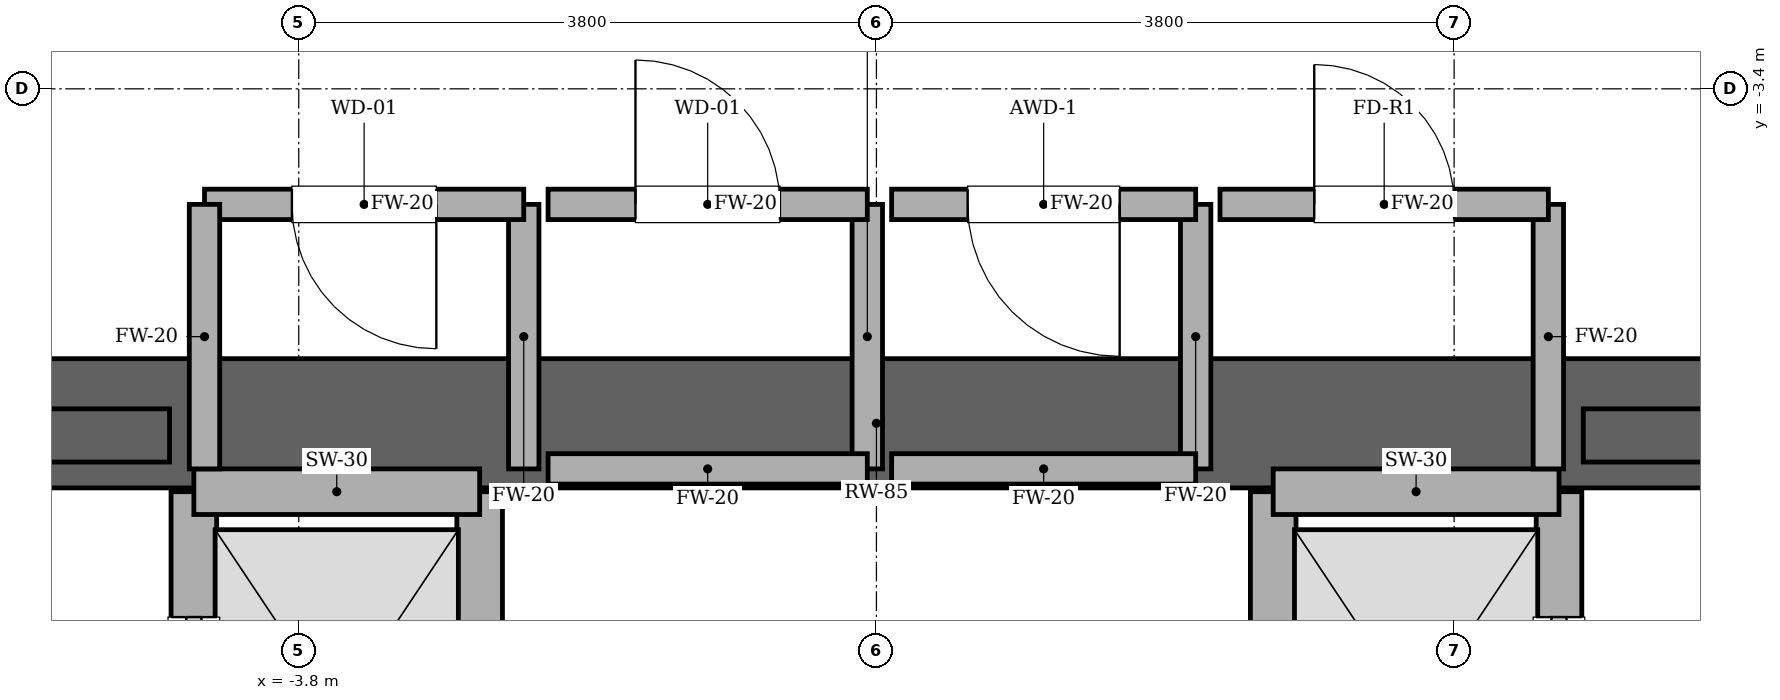
"""IFC4 building model, lengths in metres.
Left out: names, types, materials, properties, quantities, classifications, styles, units other than length and angle.
Written with IfcOpenShell. Run it as: python <this file> out.ifc"""

import sys

from ifc_helpers import new_model, si_unit, direction, frame, frame_2d, origin, place, context, subcontext, project, spatial, rectangle, extrude, element, fill, save


model = new_model("IFC4")
c1 = context("Model", 3, precision=1e-05, world=origin(), true_north=direction((0.0, 1.0)))
c2 = subcontext(c1, "Body", "Model", "MODEL_VIEW")
j1 = project(units=[si_unit("LENGTHUNIT", "METRE"), si_unit("PLANEANGLEUNIT", "RADIAN")], contexts=[c1])
p1 = place(None, origin())
s1 = spatial("IfcSite", under=j1, at=p1, CompositionType="ELEMENT")
p2 = place(p1, origin())
s2 = spatial("IfcBuilding", under=s1, at=p2, CompositionType="ELEMENT")
p3 = place(p2, frame((0.0, 0.0, -9.6)))
s3 = spatial("IfcBuildingStorey", under=s2, at=p3, CompositionType="ELEMENT", Elevation=-9.6)
p4 = place(p3, frame((-6.0, -5.6, -1.6), z_axis=(0.0, 0.0, 1.0), x_axis=(1.0, 0.0, 0.0)))
e1 = element("IfcWall", 1, at=p4, inside=s3, PredefinedType="USERDEFINED", context=c2, shape_type="SweptSolid", body=[
    extrude(rectangle(XDim=12.0, YDim=0.85, at=frame_2d((6.0, 0.0))), origin(), (0.0, 0.0, 1.0), 1.6),
])
p5 = place(p3, frame((-9.825, -5.68, 0.0), z_axis=(0.0, 0.0, 1.0), x_axis=(1.0, 0.0, 0.0)))
e2 = element("IfcWall", 2, at=p5, inside=s3, PredefinedType="SOLIDWALL", context=c2, shape_type="SweptSolid", body=[
    extrude(rectangle(XDim=5.175, YDim=0.35, at=frame_2d((2.587, 0.0))), origin(), (0.0, 0.0, 1.0), 4.8),
])
p6 = place(p5, frame((1.285, 0.0, 0.0)))
e3 = element("IfcOpeningElement", 3, at=p6, cuts=e2, PredefinedType="OPENING", context=c2, shape_type="SweptSolid", body=[
    extrude(rectangle(XDim=1.18, YDim=2.2, at=frame_2d((0.59, 1.1))), frame((0.0, 0.185, 0.0), z_axis=(0.0, -1.0, 0.0), x_axis=(1.0, 0.0, 0.0)), (0.0, 0.0, 1.0), 0.37),
])
p7 = place(p3, frame((4.65, -5.68, 0.0), z_axis=(0.0, 0.0, 1.0), x_axis=(1.0, 0.0, 0.0)))
e4 = element("IfcWall", 4, at=p7, inside=s3, PredefinedType="SOLIDWALL", context=c2, shape_type="SweptSolid", body=[
    extrude(rectangle(XDim=5.175, YDim=0.35, at=frame_2d((2.587, 0.0))), origin(), (0.0, 0.0, 1.0), 4.8),
])
p8 = place(p7, frame((2.71, 0.0, 0.0)))
e5 = element("IfcOpeningElement", 5, at=p8, cuts=e4, PredefinedType="OPENING", context=c2, shape_type="SweptSolid", body=[
    extrude(rectangle(XDim=1.18, YDim=2.2, at=frame_2d((0.59, 1.1))), frame((0.0, 0.185, 0.0), z_axis=(0.0, -1.0, 0.0), x_axis=(1.0, 0.0, 0.0)), (0.0, 0.0, 1.0), 0.37),
])
p9 = place(p3, frame((-4.49, -8.82, 0.0), z_axis=(0.0, 0.0, 1.0), x_axis=(0.0, 1.0, 0.0)))
e6 = element("IfcWall", 6, at=p9, inside=s3, PredefinedType="SOLIDWALL", context=c2, shape_type="SweptSolid", body=[
    extrude(rectangle(XDim=2.77, YDim=0.3, at=frame_2d((1.385, 0.0))), origin(), (0.0, 0.0, 1.0), 4.52),
])
p10 = place(p9, frame((0.825, 0.0, 0.0)))
e7 = element("IfcOpeningElement", 7, at=p10, cuts=e6, PredefinedType="OPENING", context=c2, shape_type="SweptSolid", body=[
    extrude(rectangle(XDim=1.12, YDim=2.25, at=frame_2d((0.56, 1.125))), frame((0.0, 0.16, 0.0), z_axis=(0.0, -1.0, 0.0), x_axis=(1.0, 0.0, 0.0)), (0.0, 0.0, 1.0), 0.32),
])
p11 = place(p3, frame((-2.61, -8.82, 0.0), z_axis=(0.0, 0.0, 1.0), x_axis=(0.0, 1.0, 0.0)))
e8 = element("IfcWall", 8, at=p11, inside=s3, PredefinedType="SOLIDWALL", context=c2, shape_type="SweptSolid", body=[
    extrude(rectangle(XDim=2.77, YDim=0.3, at=frame_2d((1.385, 0.0))), origin(), (0.0, 0.0, 1.0), 4.52),
])
p12 = place(p3, frame((-4.49, -6.05, 0.0), z_axis=(0.0, 0.0, 1.0), x_axis=(1.0, 0.0, 0.0)))
e9 = element("IfcWall", 9, at=p12, inside=s3, PredefinedType="SOLIDWALL", context=c2, shape_type="SweptSolid", body=[
    extrude(rectangle(XDim=1.88, YDim=0.3, at=frame_2d((0.94, 0.0))), origin(), (0.0, 0.0, 1.0), 4.52),
])
p13 = place(p3, frame((4.49, -8.82, 0.0), z_axis=(0.0, 0.0, 1.0), x_axis=(0.0, 1.0, 0.0)))
e10 = element("IfcWall", 10, at=p13, inside=s3, PredefinedType="SOLIDWALL", context=c2, shape_type="SweptSolid", body=[
    extrude(rectangle(XDim=2.77, YDim=0.3, at=frame_2d((1.385, 0.0))), origin(), (0.0, 0.0, 1.0), 4.52),
])
p14 = place(p13, frame((0.825, 0.0, 0.0)))
e11 = element("IfcOpeningElement", 11, at=p14, cuts=e10, PredefinedType="OPENING", context=c2, shape_type="SweptSolid", body=[
    extrude(rectangle(XDim=1.12, YDim=2.25, at=frame_2d((0.56, 1.125))), frame((0.0, 0.16, 0.0), z_axis=(0.0, -1.0, 0.0), x_axis=(1.0, 0.0, 0.0)), (0.0, 0.0, 1.0), 0.32),
])
p15 = place(p3, frame((2.61, -8.82, 0.0), z_axis=(0.0, 0.0, 1.0), x_axis=(0.0, 1.0, 0.0)))
e12 = element("IfcWall", 12, at=p15, inside=s3, PredefinedType="SOLIDWALL", context=c2, shape_type="SweptSolid", body=[
    extrude(rectangle(XDim=2.77, YDim=0.3, at=frame_2d((1.385, 0.0))), origin(), (0.0, 0.0, 1.0), 4.52),
])
p16 = place(p3, frame((2.61, -6.05, 0.0), z_axis=(0.0, 0.0, 1.0), x_axis=(1.0, 0.0, 0.0)))
e13 = element("IfcWall", 13, at=p16, inside=s3, PredefinedType="SOLIDWALL", context=c2, shape_type="SweptSolid", body=[
    extrude(rectangle(XDim=1.88, YDim=0.3, at=frame_2d((0.94, 0.0))), origin(), (0.0, 0.0, 1.0), 4.52),
])
p17 = place(p3, frame((-2.32, -5.9, 0.0), z_axis=(0.0, 0.0, 1.0), x_axis=(0.0, 1.0, 0.0)))
e14 = element("IfcWall", 14, at=p17, inside=s3, PredefinedType="SOLIDWALL", context=c2, shape_type="SweptSolid", body=[
    extrude(rectangle(XDim=1.74, YDim=0.2, at=frame_2d((0.87, 0.0))), origin(), (0.0, 0.0, 1.0), 4.52),
])
p18 = place(p3, frame((-2.32, -4.16, 0.0), z_axis=(0.0, 0.0, 1.0), x_axis=(-1.0, 0.0, 0.0)))
e15 = element("IfcWall", 15, at=p18, inside=s3, PredefinedType="SOLIDWALL", context=c2, shape_type="SweptSolid", body=[
    extrude(rectangle(XDim=2.1, YDim=0.2, at=frame_2d((1.05, 0.0))), origin(), (0.0, 0.0, 1.0), 4.52),
])
p19 = place(p18, frame((0.575, 0.0, 0.0)))
e16 = element("IfcOpeningElement", 16, at=p19, cuts=e15, PredefinedType="OPENING", context=c2, shape_type="SweptSolid", body=[
    extrude(rectangle(XDim=0.95, YDim=2.15, at=frame_2d((0.475, 1.075))), frame((0.0, 0.11, 0.0), z_axis=(0.0, -1.0, 0.0), x_axis=(1.0, 0.0, 0.0)), (0.0, 0.0, 1.0), 0.22),
])
for number, where, z_axis, x_axis in (
    (17, (-4.42, -4.16, 0.0), (0.0, 0.0, 1.0), (0.0, -1.0, 0.0)),
    (18, (-0.06, -5.9, 0.0), (0.0, 0.0, 1.0), (0.0, 1.0, 0.0)),
):
    element("IfcWall", number, at=place(p3, frame(where, z_axis=z_axis, x_axis=x_axis)), inside=s3, PredefinedType="SOLIDWALL", context=c2, shape_type="SweptSolid", body=[
        extrude(rectangle(XDim=1.74, YDim=0.2, at=frame_2d((0.87, 0.0))), origin(), (0.0, 0.0, 1.0), 4.52),
    ])
p20 = place(p3, frame((-0.06, -4.16, 0.0), z_axis=(0.0, 0.0, 1.0), x_axis=(-1.0, 0.0, 0.0)))
e19 = element("IfcWall", 19, at=p20, inside=s3, PredefinedType="SOLIDWALL", context=c2, shape_type="SweptSolid", body=[
    extrude(rectangle(XDim=2.1, YDim=0.2, at=frame_2d((1.05, 0.0))), origin(), (0.0, 0.0, 1.0), 4.52),
])
p21 = place(p20, frame((0.575, 0.0, 0.0)))
e20 = element("IfcOpeningElement", 20, at=p21, cuts=e19, PredefinedType="OPENING", context=c2, shape_type="SweptSolid", body=[
    extrude(rectangle(XDim=0.95, YDim=2.15, at=frame_2d((0.475, 1.075))), frame((0.0, 0.11, 0.0), z_axis=(0.0, -1.0, 0.0), x_axis=(1.0, 0.0, 0.0)), (0.0, 0.0, 1.0), 0.22),
])
p22 = place(p3, frame((-2.16, -5.9, 0.0), z_axis=(0.0, 0.0, 1.0), x_axis=(1.0, 0.0, 0.0)))
e21 = element("IfcWall", 21, at=p22, inside=s3, PredefinedType="SOLIDWALL", context=c2, shape_type="SweptSolid", body=[
    extrude(rectangle(XDim=2.1, YDim=0.2, at=frame_2d((1.05, 0.0))), origin(), (0.0, 0.0, 1.0), 4.52),
])
p23 = place(p3, frame((2.1, -5.9, 0.0), z_axis=(0.0, 0.0, 1.0), x_axis=(0.0, 1.0, 0.0)))
e22 = element("IfcWall", 22, at=p23, inside=s3, PredefinedType="SOLIDWALL", context=c2, shape_type="SweptSolid", body=[
    extrude(rectangle(XDim=1.74, YDim=0.2, at=frame_2d((0.87, 0.0))), origin(), (0.0, 0.0, 1.0), 4.52),
])
p24 = place(p3, frame((2.1, -4.16, 0.0), z_axis=(0.0, 0.0, 1.0), x_axis=(-1.0, 0.0, 0.0)))
e23 = element("IfcWall", 23, at=p24, inside=s3, PredefinedType="SOLIDWALL", context=c2, shape_type="SweptSolid", body=[
    extrude(rectangle(XDim=2.0, YDim=0.2, at=frame_2d((1.0, 0.0))), origin(), (0.0, 0.0, 1.0), 4.52),
])
p25 = place(p24, frame((0.5, 0.0, 0.0)))
e24 = element("IfcOpeningElement", 24, at=p25, cuts=e23, PredefinedType="OPENING", context=c2, shape_type="SweptSolid", body=[
    extrude(rectangle(XDim=1.0, YDim=2.15, at=frame_2d((0.5, 1.075))), frame((0.0, 0.11, 0.0), z_axis=(0.0, -1.0, 0.0), x_axis=(1.0, 0.0, 0.0)), (0.0, 0.0, 1.0), 0.22),
])
p26 = place(p3, frame((0.1, -5.9, 0.0), z_axis=(0.0, 0.0, 1.0), x_axis=(1.0, 0.0, 0.0)))
e25 = element("IfcWall", 25, at=p26, inside=s3, PredefinedType="SOLIDWALL", context=c2, shape_type="SweptSolid", body=[
    extrude(rectangle(XDim=2.0, YDim=0.2, at=frame_2d((1.0, 0.0))), origin(), (0.0, 0.0, 1.0), 4.52),
])
p27 = place(p3, frame((4.42, -5.9, 0.0), z_axis=(0.0, 0.0, 1.0), x_axis=(0.0, 1.0, 0.0)))
e26 = element("IfcWall", 26, at=p27, inside=s3, PredefinedType="SOLIDWALL", context=c2, shape_type="SweptSolid", body=[
    extrude(rectangle(XDim=1.74, YDim=0.2, at=frame_2d((0.87, 0.0))), origin(), (0.0, 0.0, 1.0), 4.52),
])
p28 = place(p3, frame((4.42, -4.16, 0.0), z_axis=(0.0, 0.0, 1.0), x_axis=(-1.0, 0.0, 0.0)))
e27 = element("IfcWall", 27, at=p28, inside=s3, PredefinedType="SOLIDWALL", context=c2, shape_type="SweptSolid", body=[
    extrude(rectangle(XDim=2.16, YDim=0.2, at=frame_2d((1.08, 0.0))), origin(), (0.0, 0.0, 1.0), 4.52),
])
p29 = place(p28, frame((0.62, 0.0, 0.0)))
e28 = element("IfcOpeningElement", 28, at=p29, cuts=e27, PredefinedType="OPENING", context=c2, shape_type="SweptSolid", body=[
    extrude(rectangle(XDim=0.92, YDim=2.1, at=frame_2d((0.46, 1.05))), frame((0.0, 0.11, 0.0), z_axis=(0.0, -1.0, 0.0), x_axis=(1.0, 0.0, 0.0)), (0.0, 0.0, 1.0), 0.22),
])
p30 = place(p10, origin())
e29 = element("IfcDoor", 29, at=p30, inside=s3, OperationType="SLIDING_TO_LEFT", PredefinedType="DOOR", context=c2, shape_type="SweptSolid", body=[
    extrude(rectangle(XDim=1.12, YDim=2.25, at=frame_2d((0.56, 1.125))), frame((0.0, 0.025, 0.0), z_axis=(0.0, -1.0, 0.0), x_axis=(1.0, 0.0, 0.0)), (0.0, 0.0, 1.0), 0.05),
])
fill(e7, e29)
p31 = place(p14, origin())
e30 = element("IfcDoor", 30, at=p31, inside=s3, OperationType="SLIDING_TO_RIGHT", PredefinedType="DOOR", context=c2, shape_type="SweptSolid", body=[
    extrude(rectangle(XDim=1.12, YDim=2.25, at=frame_2d((0.56, 1.125))), frame((0.0, 0.025, 0.0), z_axis=(0.0, -1.0, 0.0), x_axis=(1.0, 0.0, 0.0)), (0.0, 0.0, 1.0), 0.05),
])
fill(e11, e30)
p32 = place(p19, origin())
e31 = element("IfcDoor", 31, at=p32, inside=s3, OperationType="SINGLE_SWING_LEFT", PredefinedType="DOOR", context=c2, shape_type="SweptSolid", body=[
    extrude(rectangle(XDim=0.95, YDim=2.15, at=frame_2d((0.475, 1.075))), frame((0.0, 0.025, 0.0), z_axis=(0.0, -1.0, 0.0), x_axis=(1.0, 0.0, 0.0)), (0.0, 0.0, 1.0), 0.05),
])
fill(e16, e31)
p33 = place(p21, origin())
e32 = element("IfcDoor", 32, at=p33, inside=s3, OperationType="SINGLE_SWING_RIGHT", PredefinedType="DOOR", context=c2, shape_type="SweptSolid", body=[
    extrude(rectangle(XDim=0.95, YDim=2.15, at=frame_2d((0.475, 1.075))), frame((0.0, 0.025, 0.0), z_axis=(0.0, -1.0, 0.0), x_axis=(1.0, 0.0, 0.0)), (0.0, 0.0, 1.0), 0.05),
])
fill(e20, e32)
p34 = place(p25, origin())
e33 = element("IfcDoor", 33, at=p34, inside=s3, OperationType="SINGLE_SWING_LEFT", PredefinedType="DOOR", context=c2, shape_type="SweptSolid", body=[
    extrude(rectangle(XDim=1.0, YDim=2.15, at=frame_2d((0.5, 1.075))), frame((0.0, 0.025, 0.0), z_axis=(0.0, -1.0, 0.0), x_axis=(1.0, 0.0, 0.0)), (0.0, 0.0, 1.0), 0.05),
])
fill(e24, e33)
p35 = place(p29, origin())
e34 = element("IfcDoor", 34, at=p35, inside=s3, OperationType="SINGLE_SWING_RIGHT", PredefinedType="DOOR", context=c2, shape_type="SweptSolid", body=[
    extrude(rectangle(XDim=0.92, YDim=2.1, at=frame_2d((0.46, 1.05))), frame((0.0, 0.025, 0.0), z_axis=(0.0, -1.0, 0.0), x_axis=(1.0, 0.0, 0.0)), (0.0, 0.0, 1.0), 0.05),
])
fill(e28, e34)
save(model, sys.argv[1])
